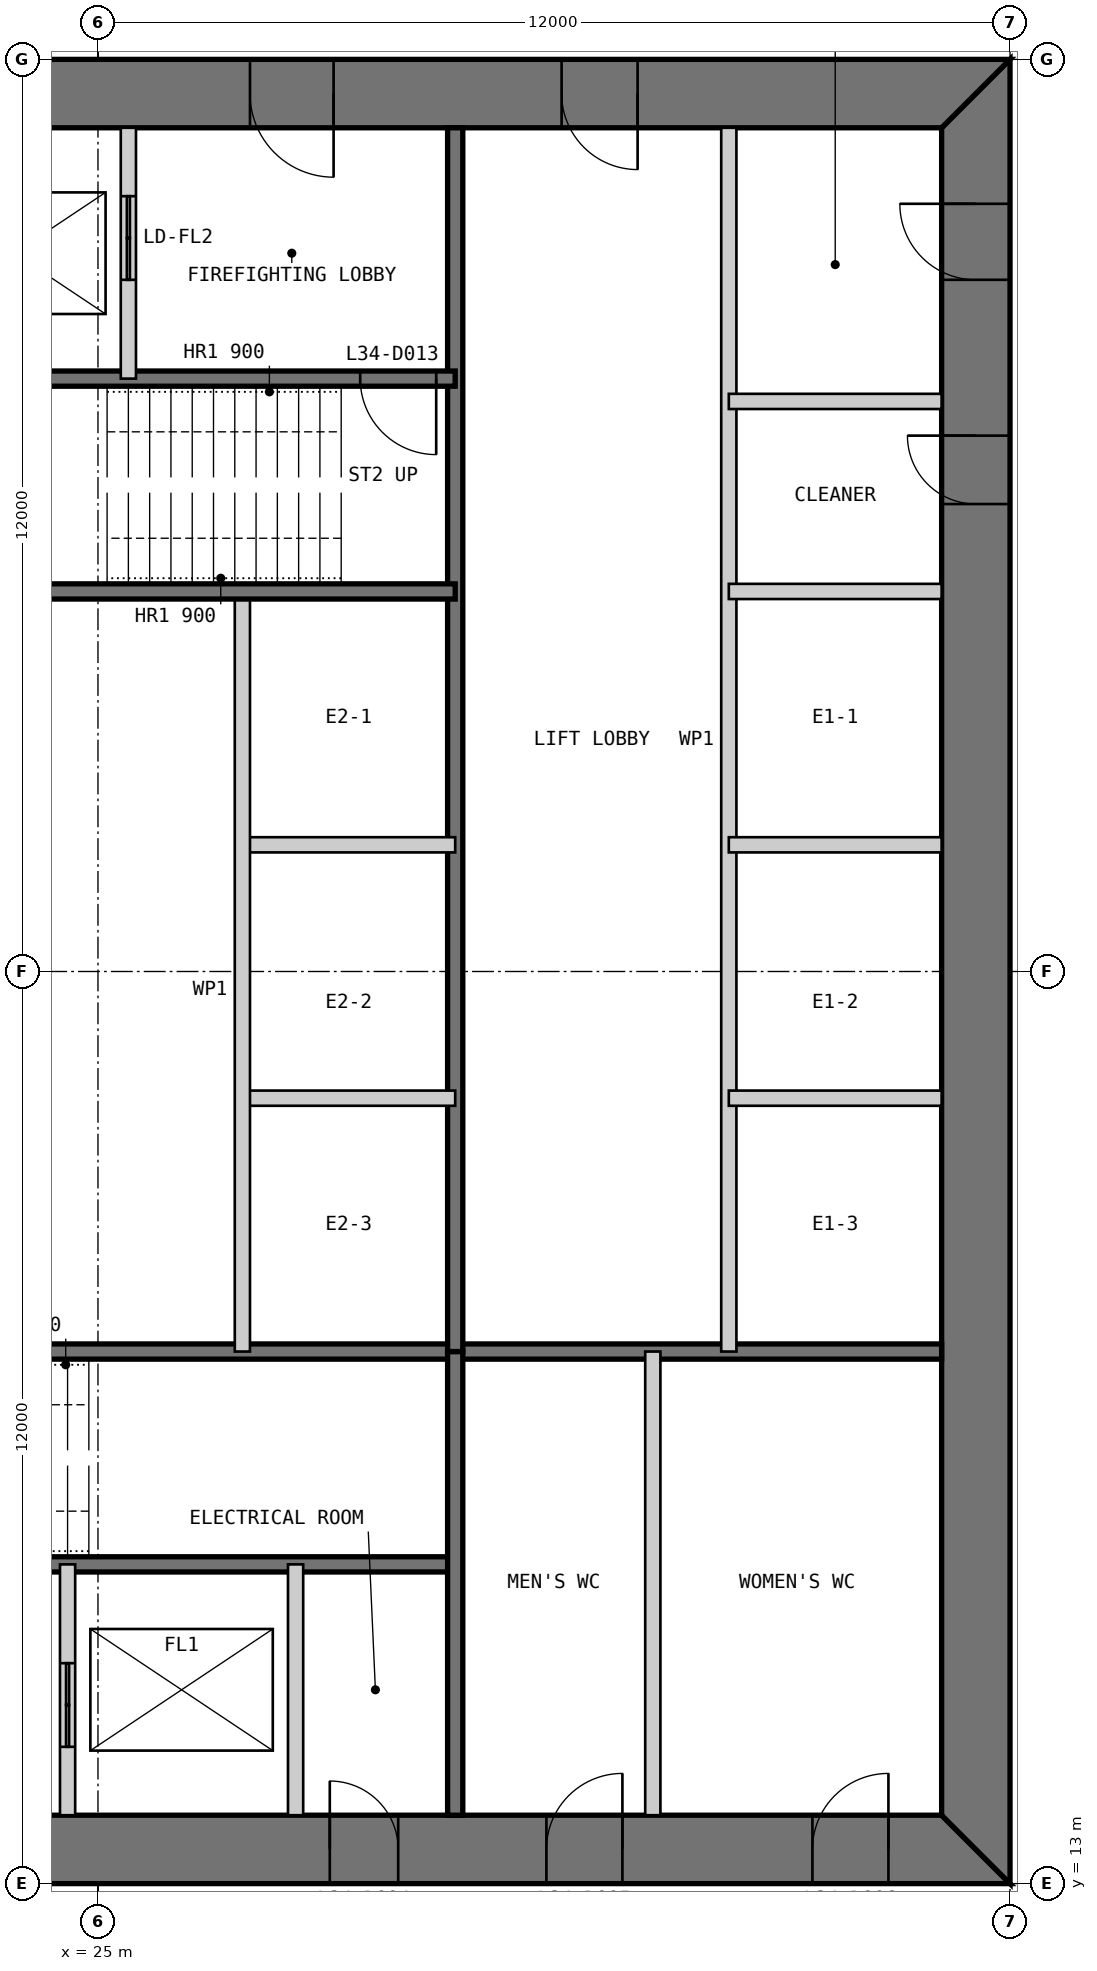
"""IFC4 building model, lengths in metres.
Left out: names, types, materials, properties, quantities, classifications, styles, units other than length and angle.
Written with IfcOpenShell. Run it as: python <this file> out.ifc"""

import sys

from ifc_helpers import new_model, si_unit, direction, frame, frame_2d, origin, place, context, subcontext, project, spatial, polyline, rectangle, outline, extrude, element, fill, save


model = new_model("IFC4")
c1 = context("Model", 3, precision=1e-05, world=origin(), true_north=direction((0.0, 1.0)))
c2 = subcontext(c1, "Body", "Model", "MODEL_VIEW")
j1 = project(units=[si_unit("LENGTHUNIT", "METRE"), si_unit("PLANEANGLEUNIT", "RADIAN")], contexts=[c1])
p1 = place(None, origin())
s1 = spatial("IfcSite", under=j1, at=p1, CompositionType="ELEMENT")
p2 = place(p1, origin())
s2 = spatial("IfcBuilding", under=s1, at=p2, CompositionType="ELEMENT")
p3 = place(p2, frame((0.0, 0.0, 146.4)))
s3 = spatial("IfcBuildingStorey", under=s2, at=p3, CompositionType="ELEMENT", Elevation=146.4)
p4 = place(p3, frame((13.0, 13.45, 0.0), z_axis=(0.0, 0.0, 1.0), x_axis=(1.0, 0.0, 0.0)))
e1 = element("IfcWall", 1, at=p4, inside=s3, PredefinedType="SHEAR", context=c2, shape_type="SweptSolid", body=[
    extrude(outline(polyline([(0.0, -0.45), (24.0, -0.45), (23.1, 0.45), (0.9, 0.45), (0.0, -0.45)])), origin(), (0.0, 0.0, 1.0), 4.0),
])
p5 = place(p4, frame((4.9, 0.0, 0.0)))
e2 = element("IfcOpeningElement", 2, at=p5, cuts=e1, PredefinedType="OPENING", context=c2, shape_type="SweptSolid", body=[
    extrude(rectangle(XDim=1.0, YDim=2.2, at=frame_2d((0.5, 1.1))), frame((0.0, 0.46, 0.0), z_axis=(0.0, -1.0, 0.0), x_axis=(1.0, 0.0, 0.0)), (0.0, 0.0, 1.0), 0.92),
])
p6 = place(p4, frame((8.9, 0.0, 0.0)))
e3 = element("IfcOpeningElement", 3, at=p6, cuts=e1, PredefinedType="OPENING", context=c2, shape_type="SweptSolid", body=[
    extrude(rectangle(XDim=1.1, YDim=2.2, at=frame_2d((0.55, 1.1))), frame((0.0, 0.46, 0.0), z_axis=(0.0, -1.0, 0.0), x_axis=(1.0, 0.0, 0.0)), (0.0, 0.0, 1.0), 0.92),
])
p7 = place(p4, frame((15.05, 0.0, 0.0)))
e4 = element("IfcOpeningElement", 4, at=p7, cuts=e1, PredefinedType="OPENING", context=c2, shape_type="SweptSolid", body=[
    extrude(rectangle(XDim=0.9, YDim=2.2, at=frame_2d((0.45, 1.1))), frame((0.0, 0.46, 0.0), z_axis=(0.0, -1.0, 0.0), x_axis=(1.0, 0.0, 0.0)), (0.0, 0.0, 1.0), 0.92),
])
p8 = place(p4, frame((17.9, 0.0, 0.0)))
e5 = element("IfcOpeningElement", 5, at=p8, cuts=e1, PredefinedType="OPENING", context=c2, shape_type="SweptSolid", body=[
    extrude(rectangle(XDim=1.0, YDim=2.2, at=frame_2d((0.5, 1.1))), frame((0.0, 0.46, 0.0), z_axis=(0.0, -1.0, 0.0), x_axis=(1.0, 0.0, 0.0)), (0.0, 0.0, 1.0), 0.92),
])
p9 = place(p4, frame((21.4, 0.0, 0.0)))
e6 = element("IfcOpeningElement", 6, at=p9, cuts=e1, PredefinedType="OPENING", context=c2, shape_type="SweptSolid", body=[
    extrude(rectangle(XDim=1.0, YDim=2.2, at=frame_2d((0.5, 1.1))), frame((0.0, 0.46, 0.0), z_axis=(0.0, -1.0, 0.0), x_axis=(1.0, 0.0, 0.0)), (0.0, 0.0, 1.0), 0.92),
])
p10 = place(p3, frame((36.55, 13.9, 0.0), z_axis=(0.0, 0.0, 1.0), x_axis=(0.0, 1.0, 0.0)))
e7 = element("IfcWall", 7, at=p10, inside=s3, PredefinedType="SHEAR", context=c2, shape_type="SweptSolid", body=[
    extrude(outline(polyline([(-0.9, -0.45), (23.1, -0.45), (22.2, 0.45), (0.0, 0.45), (-0.9, -0.45)])), origin(), (0.0, 0.0, 1.0), 4.0),
])
p11 = place(p10, frame((20.2, 0.0, 0.0)))
e8 = element("IfcOpeningElement", 8, at=p11, cuts=e7, PredefinedType="OPENING", context=c2, shape_type="SweptSolid", body=[
    extrude(rectangle(XDim=1.0, YDim=2.2, at=frame_2d((0.5, 1.1))), frame((0.0, 0.46, 0.0), z_axis=(0.0, -1.0, 0.0), x_axis=(1.0, 0.0, 0.0)), (0.0, 0.0, 1.0), 0.92),
])
p12 = place(p10, frame((17.25, 0.0, 0.0)))
e9 = element("IfcOpeningElement", 9, at=p12, cuts=e7, PredefinedType="OPENING", context=c2, shape_type="SweptSolid", body=[
    extrude(rectangle(XDim=0.9, YDim=2.2, at=frame_2d((0.45, 1.1))), frame((0.0, 0.46, 0.0), z_axis=(0.0, -1.0, 0.0), x_axis=(1.0, 0.0, 0.0)), (0.0, 0.0, 1.0), 0.92),
])
p13 = place(p3, frame((37.0, 36.55, 0.0), z_axis=(0.0, 0.0, 1.0), x_axis=(-1.0, 0.0, 0.0)))
e10 = element("IfcWall", 10, at=p13, inside=s3, PredefinedType="SHEAR", context=c2, shape_type="SweptSolid", body=[
    extrude(outline(polyline([(0.0, -0.45), (24.0, -0.45), (23.1, 0.45), (0.9, 0.45), (0.0, -0.45)])), origin(), (0.0, 0.0, 1.0), 4.0),
])
p14 = place(p13, frame((4.9, 0.0, 0.0)))
e11 = element("IfcOpeningElement", 11, at=p14, cuts=e10, PredefinedType="OPENING", context=c2, shape_type="SweptSolid", body=[
    extrude(rectangle(XDim=1.0, YDim=2.2, at=frame_2d((0.5, 1.1))), frame((0.0, 0.46, 0.0), z_axis=(0.0, -1.0, 0.0), x_axis=(1.0, 0.0, 0.0)), (0.0, 0.0, 1.0), 0.92),
])
p15 = place(p13, frame((8.9, 0.0, 0.0)))
e12 = element("IfcOpeningElement", 12, at=p15, cuts=e10, PredefinedType="OPENING", context=c2, shape_type="SweptSolid", body=[
    extrude(rectangle(XDim=1.1, YDim=2.2, at=frame_2d((0.55, 1.1))), frame((0.0, 0.46, 0.0), z_axis=(0.0, -1.0, 0.0), x_axis=(1.0, 0.0, 0.0)), (0.0, 0.0, 1.0), 0.92),
])
p16 = place(p13, frame((15.05, 0.0, 0.0)))
e13 = element("IfcOpeningElement", 13, at=p16, cuts=e10, PredefinedType="OPENING", context=c2, shape_type="SweptSolid", body=[
    extrude(rectangle(XDim=0.9, YDim=2.2, at=frame_2d((0.45, 1.1))), frame((0.0, 0.46, 0.0), z_axis=(0.0, -1.0, 0.0), x_axis=(1.0, 0.0, 0.0)), (0.0, 0.0, 1.0), 0.92),
])
p17 = place(p13, frame((17.9, 0.0, 0.0)))
e14 = element("IfcOpeningElement", 14, at=p17, cuts=e10, PredefinedType="OPENING", context=c2, shape_type="SweptSolid", body=[
    extrude(rectangle(XDim=1.0, YDim=2.2, at=frame_2d((0.5, 1.1))), frame((0.0, 0.46, 0.0), z_axis=(0.0, -1.0, 0.0), x_axis=(1.0, 0.0, 0.0)), (0.0, 0.0, 1.0), 0.92),
])
p18 = place(p13, frame((21.4, 0.0, 0.0)))
e15 = element("IfcOpeningElement", 15, at=p18, cuts=e10, PredefinedType="OPENING", context=c2, shape_type="SweptSolid", body=[
    extrude(rectangle(XDim=1.0, YDim=2.2, at=frame_2d((0.5, 1.1))), frame((0.0, 0.46, 0.0), z_axis=(0.0, -1.0, 0.0), x_axis=(1.0, 0.0, 0.0)), (0.0, 0.0, 1.0), 0.92),
])
p19 = place(p3, frame((20.3, 17.2, 0.0), z_axis=(0.0, 0.0, 1.0), x_axis=(1.0, 0.0, 0.0)))
e16 = element("IfcWall", 16, at=p19, inside=s3, PredefinedType="SOLIDWALL", context=c2, shape_type="SweptSolid", body=[
    extrude(rectangle(XDim=9.4, YDim=0.2, at=frame_2d((4.7, 0.0))), origin(), (0.0, 0.0, 1.0), 3.8),
])
p20 = place(p19, frame((0.25, 0.0, 0.0)))
e17 = element("IfcOpeningElement", 17, at=p20, cuts=e16, PredefinedType="OPENING", context=c2, shape_type="SweptSolid", body=[
    extrude(rectangle(XDim=1.0, YDim=2.2, at=frame_2d((0.5, 1.1))), frame((0.0, 0.11, 0.0), z_axis=(0.0, -1.0, 0.0), x_axis=(1.0, 0.0, 0.0)), (0.0, 0.0, 1.0), 0.22),
])
p21 = place(p3, frame((20.3, 20.0, 0.0), z_axis=(0.0, 0.0, 1.0), x_axis=(1.0, 0.0, 0.0)))
e18 = element("IfcWall", 18, at=p21, inside=s3, PredefinedType="SOLIDWALL", context=c2, shape_type="SweptSolid", body=[
    extrude(rectangle(XDim=15.8, YDim=0.2, at=frame_2d((7.9, 0.0))), origin(), (0.0, 0.0, 1.0), 3.8),
])
p22 = place(p3, frame((24.6, 13.9, 0.0), z_axis=(0.0, 0.0, 1.0), x_axis=(0.0, 1.0, 0.0)))
e19 = element("IfcWall", 19, at=p22, inside=s3, PredefinedType="PARTITIONING", context=c2, shape_type="SweptSolid", body=[
    extrude(rectangle(XDim=3.3, YDim=0.2, at=frame_2d((1.65, 0.0))), origin(), (0.0, 0.0, 1.0), 3.8),
])
p23 = place(p22, frame((0.9, 0.0, 0.0)))
e20 = element("IfcOpeningElement", 20, at=p23, cuts=e19, PredefinedType="OPENING", context=c2, shape_type="SweptSolid", body=[
    extrude(rectangle(XDim=1.1, YDim=2.2, at=frame_2d((0.55, 1.1))), frame((0.0, 0.11, 0.0), z_axis=(0.0, -1.0, 0.0), x_axis=(1.0, 0.0, 0.0)), (0.0, 0.0, 1.0), 0.22),
])
p24 = place(p3, frame((27.6, 13.9, 0.0), z_axis=(0.0, 0.0, 1.0), x_axis=(0.0, 1.0, 0.0)))
e21 = element("IfcWall", 21, at=p24, inside=s3, PredefinedType="PARTITIONING", context=c2, shape_type="SweptSolid", body=[
    extrude(rectangle(XDim=3.3, YDim=0.2, at=frame_2d((1.65, 0.0))), origin(), (0.0, 0.0, 1.0), 3.8),
])
p25 = place(p3, frame((29.7, 13.9, 0.0), z_axis=(0.0, 0.0, 1.0), x_axis=(0.0, 1.0, 0.0)))
e22 = element("IfcWall", 22, at=p25, inside=s3, PredefinedType="SOLIDWALL", context=c2, shape_type="SweptSolid", body=[
    extrude(rectangle(XDim=6.1, YDim=0.2, at=frame_2d((3.05, 0.0))), origin(), (0.0, 0.0, 1.0), 3.8),
])
p26 = place(p3, frame((32.3, 13.9, 0.0), z_axis=(0.0, 0.0, 1.0), x_axis=(0.0, 1.0, 0.0)))
e23 = element("IfcWall", 23, at=p26, inside=s3, PredefinedType="PARTITIONING", context=c2, shape_type="SweptSolid", body=[
    extrude(rectangle(XDim=6.1, YDim=0.2, at=frame_2d((3.05, 0.0))), origin(), (0.0, 0.0, 1.0), 3.8),
])
p27 = place(p3, frame((33.3, 36.1, 0.0), z_axis=(0.0, 0.0, 1.0), x_axis=(0.0, -1.0, 0.0)))
e24 = element("IfcWall", 24, at=p27, inside=s3, PredefinedType="PARTITIONING", context=c2, shape_type="SweptSolid", body=[
    extrude(rectangle(XDim=16.1, YDim=0.2, at=frame_2d((8.05, 0.0))), origin(), (0.0, 0.0, 1.0), 3.8),
])
p28 = place(p3, frame((29.7, 36.1, 0.0), z_axis=(0.0, 0.0, 1.0), x_axis=(0.0, -1.0, 0.0)))
e25 = element("IfcWall", 25, at=p28, inside=s3, PredefinedType="SOLIDWALL", context=c2, shape_type="SweptSolid", body=[
    extrude(rectangle(XDim=16.1, YDim=0.2, at=frame_2d((8.05, 0.0))), origin(), (0.0, 0.0, 1.0), 3.8),
])
for number, where, z_axis, x_axis in (
    (26, (36.1, 30.0, 0.0), (0.0, 0.0, 1.0), (-1.0, 0.0, 0.0)),
    (27, (36.1, 26.667, 0.0), (0.0, 0.0, 1.0), (-1.0, 0.0, 0.0)),
    (28, (36.1, 23.333, 0.0), (0.0, 0.0, 1.0), (-1.0, 0.0, 0.0)),
    (29, (29.7, 26.667, 0.0), (0.0, 0.0, 1.0), (-1.0, 0.0, 0.0)),
    (30, (29.7, 23.333, 0.0), (0.0, 0.0, 1.0), (-1.0, 0.0, 0.0)),
):
    element("IfcWall", number, at=place(p3, frame(where, z_axis=z_axis, x_axis=x_axis)), inside=s3, PredefinedType="PARTITIONING", context=c2, shape_type="SweptSolid", body=[
        extrude(rectangle(XDim=2.8, YDim=0.2, at=frame_2d((1.4, 0.0))), origin(), (0.0, 0.0, 1.0), 3.8),
    ])
p29 = place(p3, frame((26.9, 30.0, 0.0), z_axis=(0.0, 0.0, 1.0), x_axis=(0.0, -1.0, 0.0)))
e31 = element("IfcWall", 31, at=p29, inside=s3, PredefinedType="PARTITIONING", context=c2, shape_type="SweptSolid", body=[
    extrude(rectangle(XDim=10.0, YDim=0.2, at=frame_2d((5.0, 0.0))), origin(), (0.0, 0.0, 1.0), 3.8),
])
p30 = place(p3, frame((29.7, 32.8, 0.0), z_axis=(0.0, 0.0, 1.0), x_axis=(-1.0, 0.0, 0.0)))
e32 = element("IfcWall", 32, at=p30, inside=s3, PredefinedType="SOLIDWALL", context=c2, shape_type="SweptSolid", body=[
    extrude(rectangle(XDim=9.4, YDim=0.2, at=frame_2d((4.7, 0.0))), origin(), (0.0, 0.0, 1.0), 3.8),
])
p31 = place(p30, frame((0.25, 0.0, 0.0)))
e33 = element("IfcOpeningElement", 33, at=p31, cuts=e32, PredefinedType="OPENING", context=c2, shape_type="SweptSolid", body=[
    extrude(rectangle(XDim=1.0, YDim=2.2, at=frame_2d((0.5, 1.1))), frame((0.0, 0.11, 0.0), z_axis=(0.0, -1.0, 0.0), x_axis=(1.0, 0.0, 0.0)), (0.0, 0.0, 1.0), 0.22),
])
p32 = place(p3, frame((29.7, 30.0, 0.0), z_axis=(0.0, 0.0, 1.0), x_axis=(-1.0, 0.0, 0.0)))
e34 = element("IfcWall", 34, at=p32, inside=s3, PredefinedType="SOLIDWALL", context=c2, shape_type="SweptSolid", body=[
    extrude(rectangle(XDim=15.8, YDim=0.2, at=frame_2d((7.9, 0.0))), origin(), (0.0, 0.0, 1.0), 3.8),
])
p33 = place(p3, frame((25.4, 36.1, 0.0), z_axis=(0.0, 0.0, 1.0), x_axis=(0.0, -1.0, 0.0)))
e35 = element("IfcWall", 35, at=p33, inside=s3, PredefinedType="PARTITIONING", context=c2, shape_type="SweptSolid", body=[
    extrude(rectangle(XDim=3.3, YDim=0.2, at=frame_2d((1.65, 0.0))), origin(), (0.0, 0.0, 1.0), 3.8),
])
p34 = place(p33, frame((0.9, 0.0, 0.0)))
e36 = element("IfcOpeningElement", 36, at=p34, cuts=e35, PredefinedType="OPENING", context=c2, shape_type="SweptSolid", body=[
    extrude(rectangle(XDim=1.1, YDim=2.2, at=frame_2d((0.55, 1.1))), frame((0.0, 0.11, 0.0), z_axis=(0.0, -1.0, 0.0), x_axis=(1.0, 0.0, 0.0)), (0.0, 0.0, 1.0), 0.22),
])
p35 = place(p3, frame((36.1, 32.5, 0.0), z_axis=(0.0, 0.0, 1.0), x_axis=(-1.0, 0.0, 0.0)))
e37 = element("IfcWall", 37, at=p35, inside=s3, PredefinedType="PARTITIONING", context=c2, shape_type="SweptSolid", body=[
    extrude(rectangle(XDim=2.8, YDim=0.2, at=frame_2d((1.4, 0.0))), origin(), (0.0, 0.0, 1.0), 3.8),
])
p36 = place(p7, origin())
e38 = element("IfcDoor", 38, at=p36, inside=s3, OperationType="SINGLE_SWING_LEFT", PredefinedType="DOOR", context=c2, shape_type="SweptSolid", body=[
    extrude(rectangle(XDim=0.9, YDim=2.2, at=frame_2d((0.45, 1.1))), frame((0.0, 0.025, 0.0), z_axis=(0.0, -1.0, 0.0), x_axis=(1.0, 0.0, 0.0)), (0.0, 0.0, 1.0), 0.05),
    extrude(outline(polyline([(0.0, 0.0), (0.04, 0.0), (0.04, 2.16), (0.86, 2.16), (0.86, 0.0), (0.9, 0.0), (0.9, 2.2), (0.0, 2.2), (0.0, 0.0)])), frame((0.0, 0.3, 0.0), z_axis=(0.0, -1.0, 0.0), x_axis=(1.0, 0.0, 0.0)), (0.0, 0.0, 1.0), 0.6),
])
fill(e4, e38)
p37 = place(p8, origin())
e39 = element("IfcDoor", 39, at=p37, inside=s3, OperationType="SINGLE_SWING_RIGHT", PredefinedType="DOOR", context=c2, shape_type="SweptSolid", body=[
    extrude(rectangle(XDim=1.0, YDim=2.2, at=frame_2d((0.5, 1.1))), frame((0.0, 0.025, 0.0), z_axis=(0.0, -1.0, 0.0), x_axis=(1.0, 0.0, 0.0)), (0.0, 0.0, 1.0), 0.05),
    extrude(outline(polyline([(0.0, 0.0), (0.04, 0.0), (0.04, 2.16), (0.96, 2.16), (0.96, 0.0), (1.0, 0.0), (1.0, 2.2), (0.0, 2.2), (0.0, 0.0)])), frame((0.0, 0.3, 0.0), z_axis=(0.0, -1.0, 0.0), x_axis=(1.0, 0.0, 0.0)), (0.0, 0.0, 1.0), 0.6),
])
fill(e5, e39)
p38 = place(p9, origin())
e40 = element("IfcDoor", 40, at=p38, inside=s3, OperationType="SINGLE_SWING_RIGHT", PredefinedType="DOOR", context=c2, shape_type="SweptSolid", body=[
    extrude(rectangle(XDim=1.0, YDim=2.2, at=frame_2d((0.5, 1.1))), frame((0.0, 0.025, 0.0), z_axis=(0.0, -1.0, 0.0), x_axis=(1.0, 0.0, 0.0)), (0.0, 0.0, 1.0), 0.05),
    extrude(outline(polyline([(0.0, 0.0), (0.04, 0.0), (0.04, 2.16), (0.96, 2.16), (0.96, 0.0), (1.0, 0.0), (1.0, 2.2), (0.0, 2.2), (0.0, 0.0)])), frame((0.0, 0.3, 0.0), z_axis=(0.0, -1.0, 0.0), x_axis=(1.0, 0.0, 0.0)), (0.0, 0.0, 1.0), 0.6),
])
fill(e6, e40)
p39 = place(p14, origin())
e41 = element("IfcDoor", 41, at=p39, inside=s3, OperationType="SINGLE_SWING_LEFT", PredefinedType="DOOR", context=c2, shape_type="SweptSolid", body=[
    extrude(rectangle(XDim=1.0, YDim=2.2, at=frame_2d((0.5, 1.1))), frame((0.0, 0.025, 0.0), z_axis=(0.0, -1.0, 0.0), x_axis=(1.0, 0.0, 0.0)), (0.0, 0.0, 1.0), 0.05),
    extrude(outline(polyline([(0.0, 0.0), (0.04, 0.0), (0.04, 2.16), (0.96, 2.16), (0.96, 0.0), (1.0, 0.0), (1.0, 2.2), (0.0, 2.2), (0.0, 0.0)])), frame((0.0, 0.3, 0.0), z_axis=(0.0, -1.0, 0.0), x_axis=(1.0, 0.0, 0.0)), (0.0, 0.0, 1.0), 0.6),
])
fill(e11, e41)
p40 = place(p15, origin())
e42 = element("IfcDoor", 42, at=p40, inside=s3, OperationType="SINGLE_SWING_LEFT", PredefinedType="DOOR", context=c2, shape_type="SweptSolid", body=[
    extrude(rectangle(XDim=1.1, YDim=2.2, at=frame_2d((0.55, 1.1))), frame((0.0, 0.025, 0.0), z_axis=(0.0, -1.0, 0.0), x_axis=(1.0, 0.0, 0.0)), (0.0, 0.0, 1.0), 0.05),
    extrude(outline(polyline([(0.0, 0.0), (0.04, 0.0), (0.04, 2.16), (1.06, 2.16), (1.06, 0.0), (1.1, 0.0), (1.1, 2.2), (0.0, 2.2), (0.0, 0.0)])), frame((0.0, 0.3, 0.0), z_axis=(0.0, -1.0, 0.0), x_axis=(1.0, 0.0, 0.0)), (0.0, 0.0, 1.0), 0.6),
])
fill(e12, e42)
p41 = place(p31, origin())
e43 = element("IfcDoor", 43, at=p41, inside=s3, OperationType="SINGLE_SWING_LEFT", PredefinedType="DOOR", context=c2, shape_type="SweptSolid", body=[
    extrude(rectangle(XDim=1.0, YDim=2.2, at=frame_2d((0.5, 1.1))), frame((0.0, 0.025, 0.0), z_axis=(0.0, -1.0, 0.0), x_axis=(1.0, 0.0, 0.0)), (0.0, 0.0, 1.0), 0.05),
])
fill(e33, e43)
p42 = place(p11, origin())
e44 = element("IfcDoor", 44, at=p42, inside=s3, OperationType="SINGLE_SWING_RIGHT", PredefinedType="DOOR", context=c2, shape_type="SweptSolid", body=[
    extrude(rectangle(XDim=1.0, YDim=2.2, at=frame_2d((0.5, 1.1))), frame((0.0, 0.025, 0.0), z_axis=(0.0, -1.0, 0.0), x_axis=(1.0, 0.0, 0.0)), (0.0, 0.0, 1.0), 0.05),
    extrude(outline(polyline([(0.0, 0.0), (0.04, 0.0), (0.04, 2.16), (0.96, 2.16), (0.96, 0.0), (1.0, 0.0), (1.0, 2.2), (0.0, 2.2), (0.0, 0.0)])), frame((0.0, 0.3, 0.0), z_axis=(0.0, -1.0, 0.0), x_axis=(1.0, 0.0, 0.0)), (0.0, 0.0, 1.0), 0.6),
])
fill(e8, e44)
p43 = place(p12, origin())
e45 = element("IfcDoor", 45, at=p43, inside=s3, OperationType="SINGLE_SWING_RIGHT", PredefinedType="DOOR", context=c2, shape_type="SweptSolid", body=[
    extrude(rectangle(XDim=0.9, YDim=2.2, at=frame_2d((0.45, 1.1))), frame((0.0, 0.025, 0.0), z_axis=(0.0, -1.0, 0.0), x_axis=(1.0, 0.0, 0.0)), (0.0, 0.0, 1.0), 0.05),
    extrude(outline(polyline([(0.0, 0.0), (0.04, 0.0), (0.04, 2.16), (0.86, 2.16), (0.86, 0.0), (0.9, 0.0), (0.9, 2.2), (0.0, 2.2), (0.0, 0.0)])), frame((0.0, 0.3, 0.0), z_axis=(0.0, -1.0, 0.0), x_axis=(1.0, 0.0, 0.0)), (0.0, 0.0, 1.0), 0.6),
])
fill(e9, e45)
p44 = place(p23, origin())
e46 = element("IfcDoor", 46, at=p44, inside=s3, OperationType="DOUBLE_DOOR_SLIDING", PredefinedType="DOOR", context=c2, shape_type="SweptSolid", body=[
    extrude(rectangle(XDim=1.1, YDim=2.2, at=frame_2d((0.55, 1.1))), frame((0.0, 0.025, 0.0), z_axis=(0.0, -1.0, 0.0), x_axis=(1.0, 0.0, 0.0)), (0.0, 0.0, 1.0), 0.05),
])
fill(e20, e46)
p45 = place(p34, origin())
e47 = element("IfcDoor", 47, at=p45, inside=s3, OperationType="DOUBLE_DOOR_SLIDING", PredefinedType="DOOR", context=c2, shape_type="SweptSolid", body=[
    extrude(rectangle(XDim=1.1, YDim=2.2, at=frame_2d((0.55, 1.1))), frame((0.0, 0.025, 0.0), z_axis=(0.0, -1.0, 0.0), x_axis=(1.0, 0.0, 0.0)), (0.0, 0.0, 1.0), 0.05),
])
fill(e36, e47)
save(model, sys.argv[1])
